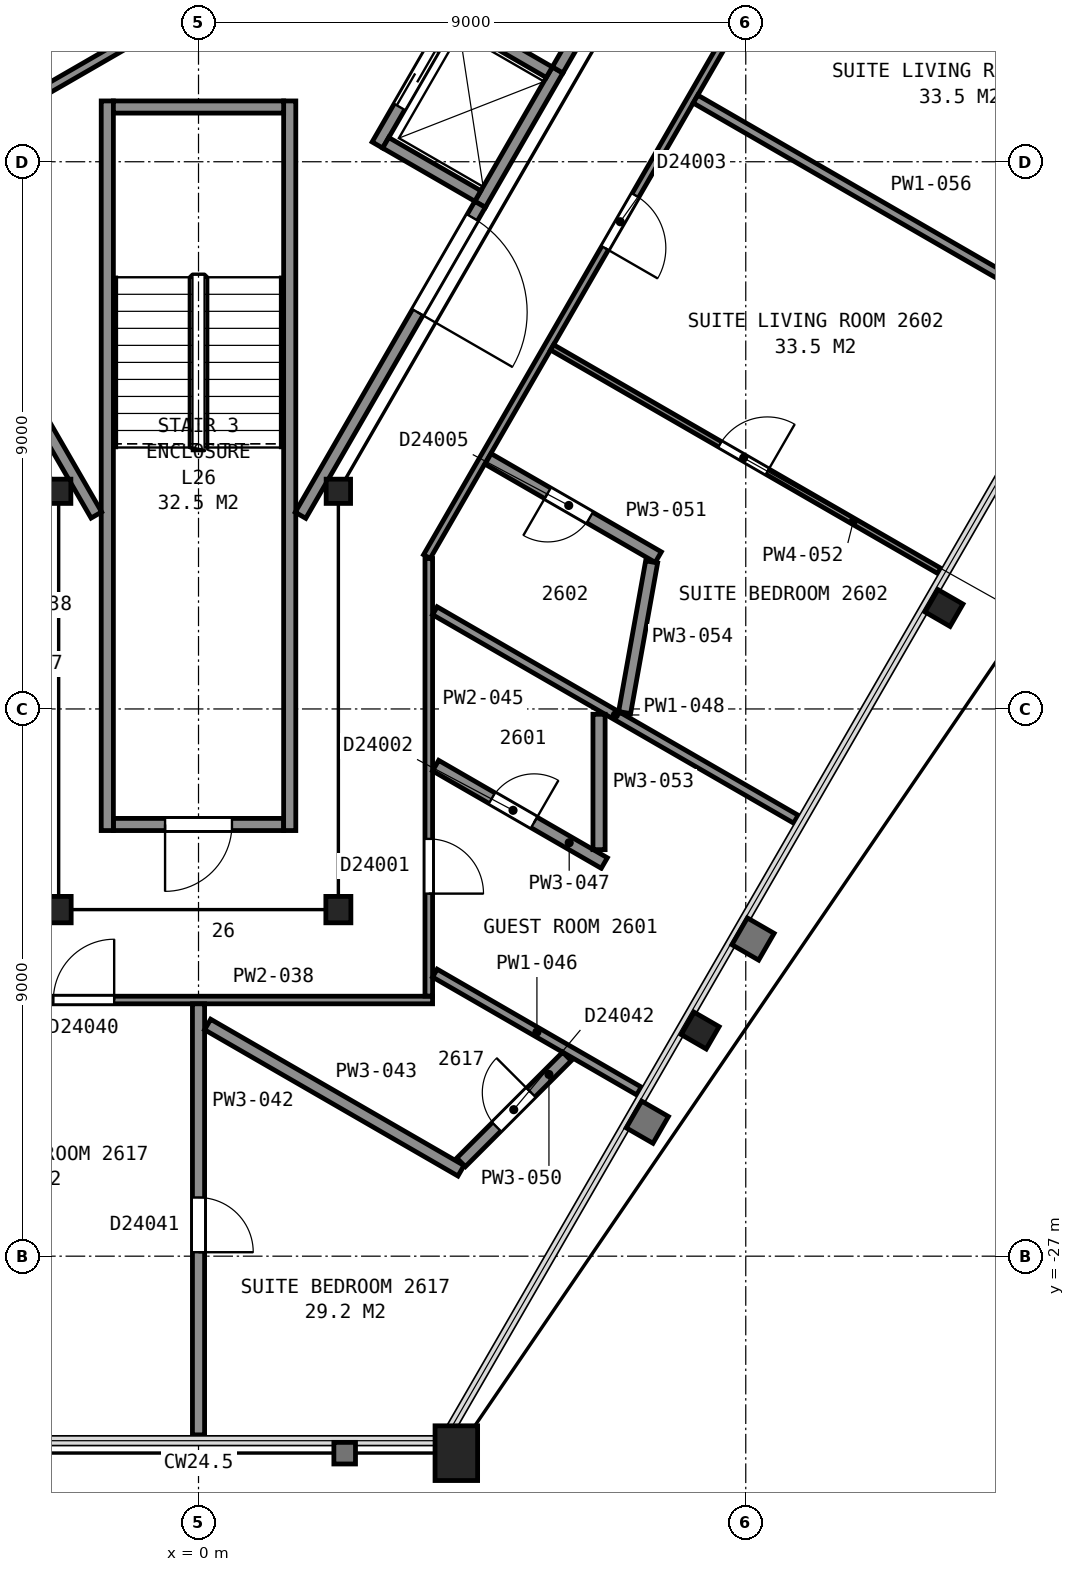
"""IFC4 building model, lengths in metres.
Left out: names, types, materials, properties, quantities, classifications, styles, units other than length and angle.
Written with IfcOpenShell. Run it as: python <this file> out.ifc"""

import sys

from ifc_helpers import new_model, si_unit, direction, frame, frame_2d, origin, origin_2d, place, context, subcontext, project, spatial, rectangle, hollow_rectangle, i_section, extrude, element, fill, save


model = new_model("IFC4")
c1 = context("Model", 3, precision=1e-05, world=origin(), true_north=direction((0.0, 1.0)))
c2 = subcontext(c1, "Body", "Model", "MODEL_VIEW")
j1 = project(units=[si_unit("LENGTHUNIT", "METRE"), si_unit("PLANEANGLEUNIT", "RADIAN")], contexts=[c1])
p1 = place(None, origin())
s1 = spatial("IfcSite", under=j1, at=p1, CompositionType="ELEMENT")
p2 = place(p1, origin())
s2 = spatial("IfcBuilding", under=s1, at=p2, CompositionType="ELEMENT")
p3 = place(p2, frame((0.0, 0.0, 110.8)))
s3 = spatial("IfcBuildingStorey", under=s2, at=p3, CompositionType="ELEMENT", Elevation=110.8)
p4 = place(p3, frame((4.24, -30.24, 0.0), z_axis=(0.0, 0.0, 1.0), x_axis=(-1.0, 0.0, 0.0)))
e1 = element("IfcColumn", 1, at=p4, inside=s3, PredefinedType="COLUMN", context=c2, shape_type="SweptSolid", body=[
    extrude(hollow_rectangle(XDim=0.7, YDim=0.9, WallThickness=0.065, at=origin_2d()), origin(), (0.0, 0.0, 1.0), 3.6),
])
for number, where, z_axis, x_axis in (
    (2, (8.25, -23.29, 0.0), (0.0, 0.0, 1.0), (-0.5, -0.866, 0.0)),
    (3, (12.26, -16.34, 0.0), (0.0, 0.0, 1.0), (-0.5, -0.866, 0.0)),
):
    element("IfcColumn", number, at=place(p3, frame(where, z_axis=z_axis, x_axis=x_axis)), inside=s3, PredefinedType="COLUMN", context=c2, shape_type="SweptSolid", body=[
        extrude(i_section(OverallWidth=0.424, OverallDepth=0.475, WebThickness=0.048, FlangeThickness=0.077, FilletRadius=0.015, at=origin_2d()), origin(), (0.0, 0.0, 1.0), 3.6),
    ])
p5 = place(p3, frame((-2.3, -14.42, 0.0), z_axis=(0.0, 0.0, 1.0), x_axis=(1.0, 0.0, 0.0)))
e4 = element("IfcColumn", 4, at=p5, inside=s3, PredefinedType="COLUMN", context=c2, shape_type="SweptSolid", body=[
    extrude(i_section(OverallWidth=0.401, OverallDepth=0.399, WebThickness=0.025, FlangeThickness=0.04, FilletRadius=0.015, at=origin_2d()), origin(), (0.0, 0.0, 1.0), 3.6),
])
for number, where, z_axis, x_axis in (
    (5, (-2.3, -21.3, 0.0), (0.0, 0.0, 1.0), (-1.0, 0.0, 0.0)),
    (6, (2.3, -21.3, 0.0), (0.0, 0.0, 1.0), (-1.0, 0.0, 0.0)),
):
    element("IfcColumn", number, at=place(p3, frame(where, z_axis=z_axis, x_axis=x_axis)), inside=s3, PredefinedType="COLUMN", context=c2, shape_type="SweptSolid", body=[
        extrude(i_section(OverallWidth=0.411, OverallDepth=0.434, WebThickness=0.036, FlangeThickness=0.057, FilletRadius=0.015, at=origin_2d()), origin(), (0.0, 0.0, 1.0), 3.6),
    ])
p6 = place(p3, frame((2.3, -14.42, 0.0), z_axis=(0.0, 0.0, 1.0), x_axis=(1.0, 0.0, 0.0)))
e7 = element("IfcColumn", 7, at=p6, inside=s3, PredefinedType="COLUMN", context=c2, shape_type="SweptSolid", body=[
    extrude(i_section(OverallWidth=0.401, OverallDepth=0.399, WebThickness=0.025, FlangeThickness=0.04, FilletRadius=0.015, at=origin_2d()), origin(), (0.0, 0.0, 1.0), 3.6),
])
p7 = place(p3, frame((-1.4, -19.9, 0.0), z_axis=(0.0, 0.0, 1.0), x_axis=(1.0, 0.0, 0.0)))
e8 = element("IfcWall", 8, at=p7, inside=s3, PredefinedType="PARTITIONING", context=c2, shape_type="SweptSolid", body=[
    extrude(rectangle(XDim=2.8, YDim=0.2, at=frame_2d((1.4, 0.0))), origin(), (0.0, 0.0, 1.0), 3.35),
])
p8 = place(p7, frame((0.85, 0.0, 0.0)))
e9 = element("IfcOpeningElement", 9, at=p8, cuts=e8, PredefinedType="OPENING", context=c2, shape_type="SweptSolid", body=[
    extrude(rectangle(XDim=1.1, YDim=2.1, at=frame_2d((0.55, 1.05))), frame((0.0, 0.11, 0.0), z_axis=(0.0, -1.0, 0.0), x_axis=(1.0, 0.0, 0.0)), (0.0, 0.0, 1.0), 0.22),
])
for number, where, z_axis, x_axis in (
    (10, (1.5, -8.0, 0.0), (0.0, 0.0, 1.0), (0.0, -1.0, 0.0)),
    (11, (-1.5, -8.0, 0.0), (0.0, 0.0, 1.0), (0.0, -1.0, 0.0)),
):
    element("IfcWall", number, at=place(p3, frame(where, z_axis=z_axis, x_axis=x_axis)), inside=s3, PredefinedType="PARTITIONING", context=c2, shape_type="SweptSolid", body=[
        extrude(rectangle(XDim=12.0, YDim=0.2, at=frame_2d((6.0, 0.0))), origin(), (0.0, 0.0, 1.0), 3.35),
    ])
p9 = place(p3, frame((-1.4, -8.1, 0.0), z_axis=(0.0, 0.0, 1.0), x_axis=(1.0, 0.0, 0.0)))
e12 = element("IfcWall", 12, at=p9, inside=s3, PredefinedType="PARTITIONING", context=c2, shape_type="SweptSolid", body=[
    extrude(rectangle(XDim=2.8, YDim=0.2, at=frame_2d((1.4, 0.0))), origin(), (0.0, 0.0, 1.0), 3.35),
])
p10 = place(p3, frame((4.63, -9.7, 0.0), z_axis=(0.0, 0.0, 1.0), x_axis=(0.500062241894, 0.865989465428, 0.0)))
e13 = element("IfcWall", 13, at=p10, inside=s3, PredefinedType="PARTITIONING", context=c2, shape_type="SweptSolid", body=[
    extrude(rectangle(XDim=2.55, YDim=0.2, at=frame_2d((1.275, 0.0))), origin(), (0.0, 0.0, 1.0), 3.6),
])
p11 = place(p3, frame((2.942, -8.725, 0.0), z_axis=(0.0, 0.0, 1.0), x_axis=(0.500020783669, 0.866013403995, 0.0)))
e14 = element("IfcWall", 14, at=p11, inside=s3, PredefinedType="PARTITIONING", context=c2, shape_type="SweptSolid", body=[
    extrude(rectangle(XDim=2.55, YDim=0.2, at=frame_2d((1.275, 0.0))), origin(), (0.0, 0.0, 1.0), 3.6),
])
p12 = place(p11, frame((0.725, 0.0, 0.0)))
e15 = element("IfcOpeningElement", 15, at=p12, cuts=e14, PredefinedType="OPENING", context=c2, shape_type="SweptSolid", body=[
    extrude(rectangle(XDim=1.1, YDim=2.1, at=frame_2d((0.55, 1.05))), frame((0.0, 0.11, 0.0), z_axis=(0.0, -1.0, 0.0), x_axis=(1.0, 0.0, 0.0)), (0.0, 0.0, 1.0), 0.22),
])
p13 = place(p3, frame((5.769, -7.528, 0.0), z_axis=(0.0, 0.0, 1.0), x_axis=(-0.866002029911, 0.500040482552, 0.0)))
e16 = element("IfcWall", 16, at=p13, inside=s3, PredefinedType="PARTITIONING", context=c2, shape_type="SweptSolid", body=[
    extrude(rectangle(XDim=1.75, YDim=0.2, at=frame_2d((0.875, 0.0))), origin(), (0.0, 0.0, 1.0), 3.6),
])
p14 = place(p3, frame((4.594, -9.563, 0.0), z_axis=(0.0, 0.0, 1.0), x_axis=(-0.866036909293, 0.499980071345, 0.0)))
e17 = element("IfcWall", 17, at=p14, inside=s3, PredefinedType="PARTITIONING", context=c2, shape_type="SweptSolid", body=[
    extrude(rectangle(XDim=1.75, YDim=0.2, at=frame_2d((0.875, 0.0))), origin(), (0.0, 0.0, 1.0), 3.6),
])
p15 = place(p3, frame((-13.664, 5.946, 0.0), z_axis=(0.0, 0.0, 1.0), x_axis=(0.499994327219, -0.866028678941, 0.0)))
e18 = element("IfcWall", 18, at=p15, inside=s3, PredefinedType="PARTITIONING", context=c2, shape_type="SweptSolid", body=[
    extrude(rectangle(XDim=23.968, YDim=0.2, at=frame_2d((11.984, 0.0))), origin(), (0.0, 0.0, 1.0), 3.35),
])
p16 = place(p3, frame((-4.825, -9.154, 0.0), z_axis=(0.0, 0.0, 1.0), x_axis=(0.866023738697, 0.500002884005, 0.0)))
e19 = element("IfcWall", 19, at=p16, inside=s3, PredefinedType="PARTITIONING", context=c2, shape_type="SweptSolid", body=[
    extrude(rectangle(XDim=4.22, YDim=0.15, at=frame_2d((2.11, 0.0))), origin(), (0.0, 0.0, 1.0), 3.35),
])
p17 = place(p16, frame((1.595, 0.0, 0.0)))
e20 = element("IfcOpeningElement", 20, at=p17, cuts=e19, PredefinedType="OPENING", context=c2, shape_type="SweptSolid", body=[
    extrude(rectangle(XDim=0.9, YDim=2.1, at=frame_2d((0.45, 1.05))), frame((0.0, 0.085, 0.0), z_axis=(0.0, -1.0, 0.0), x_axis=(1.0, 0.0, 0.0)), (0.0, 0.0, 1.0), 0.17),
])
p18 = place(p3, frame((1.677, -14.815, 0.0), z_axis=(0.0, 0.0, 1.0), x_axis=(0.49999445743, 0.866028603765, 0.0)))
e21 = element("IfcWall", 21, at=p18, inside=s3, PredefinedType="PARTITIONING", context=c2, shape_type="SweptSolid", body=[
    extrude(rectangle(XDim=5.905, YDim=0.2, at=frame_2d((2.952, 0.0))), origin(), (0.0, 0.0, 1.0), 3.35),
])
p19 = place(p18, frame((3.855, 0.0, 0.0)))
e22 = element("IfcOpeningElement", 22, at=p19, cuts=e21, PredefinedType="OPENING", context=c2, shape_type="SweptSolid", body=[
    extrude(rectangle(XDim=1.8, YDim=2.1, at=frame_2d((0.9, 1.05))), frame((0.0, 0.11, 0.0), z_axis=(0.0, -1.0, 0.0), x_axis=(1.0, 0.0, 0.0)), (0.0, 0.0, 1.0), 0.22),
])
p20 = place(p3, frame((5.906, -7.49, 0.0), z_axis=(0.0, 0.0, 1.0), x_axis=(0.500252727967, 0.865879442048, 0.0)))
e23 = element("IfcWall", 23, at=p20, inside=s3, PredefinedType="PARTITIONING", context=c2, shape_type="SweptSolid", body=[
    extrude(rectangle(XDim=2.617, YDim=0.2, at=frame_2d((1.309, 0.0))), origin(), (0.0, 0.0, 1.0), 3.35),
])
p21 = place(p3, frame((3.85, -22.787, 0.0), z_axis=(0.0, 0.0, 1.0), x_axis=(-1.0, 0.0, 0.0)))
e24 = element("IfcWall", 24, at=p21, inside=s3, PredefinedType="PARTITIONING", context=c2, shape_type="SweptSolid", body=[
    extrude(rectangle(XDim=7.699, YDim=0.125, at=frame_2d((3.85, 0.0))), origin(), (0.0, 0.0, 1.0), 2.613),
])
p22 = place(p21, frame((5.237, 0.0, 0.0)))
e25 = element("IfcOpeningElement", 25, at=p22, cuts=e24, PredefinedType="OPENING", context=c2, shape_type="SweptSolid", body=[
    extrude(rectangle(XDim=1.0, YDim=2.1, at=frame_2d((0.5, 1.05))), frame((0.0, 0.073, 0.0), z_axis=(0.0, -1.0, 0.0), x_axis=(1.0, 0.0, 0.0)), (0.0, 0.0, 1.0), 0.145),
])
p23 = place(p3, frame((0.0, -22.85, 0.0), z_axis=(0.0, 0.0, 1.0), x_axis=(0.0, -1.0, 0.0)))
e26 = element("IfcWall", 26, at=p23, inside=s3, PredefinedType="PARTITIONING", context=c2, shape_type="SweptSolid", body=[
    extrude(rectangle(XDim=7.089, YDim=0.2, at=frame_2d((3.545, 0.0))), origin(), (0.0, 0.0, 1.0), 2.613),
])
p24 = place(p23, frame((3.186, 0.0, 0.0)))
e27 = element("IfcOpeningElement", 27, at=p24, cuts=e26, PredefinedType="OPENING", context=c2, shape_type="SweptSolid", body=[
    extrude(rectangle(XDim=0.9, YDim=2.1, at=frame_2d((0.45, 1.05))), frame((0.0, 0.11, 0.0), z_axis=(0.0, -1.0, 0.0), x_axis=(1.0, 0.0, 0.0)), (0.0, 0.0, 1.0), 0.22),
])
p25 = place(p3, frame((0.15, -23.19, 0.0), z_axis=(0.0, 0.0, 1.0), x_axis=(0.866061372545, -0.499937695103, 0.0)))
e28 = element("IfcWall", 28, at=p25, inside=s3, PredefinedType="PARTITIONING", context=c2, shape_type="SweptSolid", body=[
    extrude(rectangle(XDim=4.811, YDim=0.2, at=frame_2d((2.406, 0.0))), origin(), (0.0, 0.0, 1.0), 2.613),
])
p26 = place(p3, frame((3.787, -15.525, 0.0), z_axis=(0.0, 0.0, 1.0), x_axis=(0.0, -1.0, 0.0)))
e29 = element("IfcWall", 29, at=p26, inside=s3, PredefinedType="PARTITIONING", context=c2, shape_type="SweptSolid", body=[
    extrude(rectangle(XDim=7.197, YDim=0.125, at=frame_2d((3.599, 0.0))), origin(), (0.0, 0.0, 1.0), 2.613),
])
p27 = place(p26, frame((4.612, 0.0, 0.0)))
e30 = element("IfcOpeningElement", 30, at=p27, cuts=e29, PredefinedType="OPENING", context=c2, shape_type="SweptSolid", body=[
    extrude(rectangle(XDim=0.9, YDim=2.1, at=frame_2d((0.45, 1.05))), frame((0.0, 0.073, 0.0), z_axis=(0.0, -1.0, 0.0), x_axis=(1.0, 0.0, 0.0)), (0.0, 0.0, 1.0), 0.145),
])
p28 = place(p3, frame((3.887, -22.345, 0.0), z_axis=(0.0, 0.0, 1.0), x_axis=(0.865997824551, -0.500047765591, 0.0)))
e31 = element("IfcWall", 31, at=p28, inside=s3, PredefinedType="PARTITIONING", context=c2, shape_type="SweptSolid", body=[
    extrude(rectangle(XDim=3.876, YDim=0.15, at=frame_2d((1.938, 0.0))), origin(), (0.0, 0.0, 1.0), 2.613),
])
p29 = place(p3, frame((3.899, -18.932, 0.0), z_axis=(0.0, 0.0, 1.0), x_axis=(0.865973625928, -0.500089671156, 0.0)))
e32 = element("IfcWall", 32, at=p29, inside=s3, PredefinedType="PARTITIONING", context=c2, shape_type="SweptSolid", body=[
    extrude(rectangle(XDim=3.204, YDim=0.2, at=frame_2d((1.602, 0.0))), origin(), (0.0, 0.0, 1.0), 2.613),
])
p30 = place(p29, frame((1.07, 0.0, 0.0)))
e33 = element("IfcOpeningElement", 33, at=p30, cuts=e32, PredefinedType="OPENING", context=c2, shape_type="SweptSolid", body=[
    extrude(rectangle(XDim=0.8, YDim=2.1, at=frame_2d((0.4, 1.05))), frame((0.0, 0.11, 0.0), z_axis=(0.0, -1.0, 0.0), x_axis=(1.0, 0.0, 0.0)), (0.0, 0.0, 1.0), 0.22),
])
p31 = place(p3, frame((3.887, -16.385, 0.0), z_axis=(0.0, 0.0, 1.0), x_axis=(0.86602133163, -0.500007053112, 0.0)))
e34 = element("IfcWall", 34, at=p31, inside=s3, PredefinedType="PARTITIONING", context=c2, shape_type="SweptSolid", body=[
    extrude(rectangle(XDim=6.856, YDim=0.15, at=frame_2d((3.428, 0.0))), origin(), (0.0, 0.0, 1.0), 2.613),
])
p32 = place(p3, frame((15.684, 5.165, 0.0), z_axis=(0.0, 0.0, 1.0), x_axis=(-0.500027787016, -0.866009360349, 0.0)))
e35 = element("IfcWall", 35, at=p32, inside=s3, PredefinedType="PARTITIONING", context=c2, shape_type="SweptSolid", body=[
    extrude(rectangle(XDim=23.856, YDim=0.125, at=frame_2d((11.928, 0.0))), origin(), (0.0, 0.0, 1.0), 2.613),
])
p33 = place(p32, frame((16.996, 0.0, 0.0)))
e36 = element("IfcOpeningElement", 36, at=p33, cuts=e35, PredefinedType="OPENING", context=c2, shape_type="SweptSolid", body=[
    extrude(rectangle(XDim=1.0, YDim=2.1, at=frame_2d((0.5, 1.05))), frame((0.0, 0.073, 0.0), z_axis=(0.0, -1.0, 0.0), x_axis=(1.0, 0.0, 0.0)), (0.0, 0.0, 1.0), 0.145),
])
p34 = place(p32, frame((12.28, 0.0, 0.0)))
e37 = element("IfcOpeningElement", 37, at=p34, cuts=e35, PredefinedType="OPENING", context=c2, shape_type="SweptSolid", body=[
    extrude(rectangle(XDim=1.0, YDim=2.1, at=frame_2d((0.5, 1.05))), frame((0.0, 0.073, 0.0), z_axis=(0.0, -1.0, 0.0), x_axis=(1.0, 0.0, 0.0)), (0.0, 0.0, 1.0), 0.145),
])
p35 = place(p3, frame((4.318, -25.457, 0.0), z_axis=(0.0, 0.0, 1.0), x_axis=(0.70690846209, 0.707305044677, 0.0)))
e38 = element("IfcWall", 38, at=p35, inside=s3, PredefinedType="PARTITIONING", context=c2, shape_type="SweptSolid", body=[
    extrude(rectangle(XDim=2.462, YDim=0.2, at=frame_2d((1.231, 0.0))), origin(), (0.0, 0.0, 1.0), 2.613),
])
p36 = place(p35, frame((0.825, 0.0, 0.0)))
e39 = element("IfcOpeningElement", 39, at=p36, cuts=e38, PredefinedType="OPENING", context=c2, shape_type="SweptSolid", body=[
    extrude(rectangle(XDim=0.8, YDim=2.1, at=frame_2d((0.4, 1.05))), frame((0.0, 0.11, 0.0), z_axis=(0.0, -1.0, 0.0), x_axis=(1.0, 0.0, 0.0)), (0.0, 0.0, 1.0), 0.22),
])
p37 = place(p3, frame((7.562, -15.503, 0.0), z_axis=(0.0, 0.0, 1.0), x_axis=(-0.866078705744, 0.499907666931, 0.0)))
e40 = element("IfcWall", 40, at=p37, inside=s3, PredefinedType="PARTITIONING", context=c2, shape_type="SweptSolid", body=[
    extrude(rectangle(XDim=3.233, YDim=0.2, at=frame_2d((1.616, 0.0))), origin(), (0.0, 0.0, 1.0), 2.613),
])
p38 = place(p37, frame((1.301, 0.0, 0.0)))
e41 = element("IfcOpeningElement", 41, at=p38, cuts=e40, PredefinedType="OPENING", context=c2, shape_type="SweptSolid", body=[
    extrude(rectangle(XDim=0.8, YDim=2.1, at=frame_2d((0.4, 1.05))), frame((0.0, 0.11, 0.0), z_axis=(0.0, -1.0, 0.0), x_axis=(1.0, 0.0, 0.0)), (0.0, 0.0, 1.0), 0.22),
])
p39 = place(p3, frame((12.183, -15.729, 0.0), z_axis=(0.0, 0.0, 1.0), x_axis=(-0.866066702559, 0.499928461601, 0.0)))
e42 = element("IfcWall", 42, at=p39, inside=s3, PredefinedType="PARTITIONING", context=c2, shape_type="SweptSolid", body=[
    extrude(rectangle(XDim=7.352, YDim=0.1, at=frame_2d((3.676, 0.0))), origin(), (0.0, 0.0, 1.0), 2.613),
])
p40 = place(p39, frame((3.265, 0.0, 0.0)))
e43 = element("IfcOpeningElement", 43, at=p40, cuts=e42, PredefinedType="OPENING", context=c2, shape_type="SweptSolid", body=[
    extrude(rectangle(XDim=0.9, YDim=2.1, at=frame_2d((0.45, 1.05))), frame((0.0, 0.06, 0.0), z_axis=(0.0, -1.0, 0.0), x_axis=(1.0, 0.0, 0.0)), (0.0, 0.0, 1.0), 0.12),
])
p41 = place(p3, frame((6.587, -20.314, 0.0), z_axis=(0.0, 0.0, 1.0), x_axis=(0.0, 1.0, 0.0)))
e44 = element("IfcWall", 44, at=p41, inside=s3, PredefinedType="PARTITIONING", context=c2, shape_type="SweptSolid", body=[
    extrude(rectangle(XDim=2.227, YDim=0.2, at=frame_2d((1.113, 0.0))), origin(), (0.0, 0.0, 1.0), 2.613),
])
p42 = place(p3, frame((7.007, -18.06, 0.0), z_axis=(0.0, 0.0, 1.0), x_axis=(0.176615903702, 0.984279849717, 0.0)))
e45 = element("IfcWall", 45, at=p42, inside=s3, PredefinedType="PARTITIONING", context=c2, shape_type="SweptSolid", body=[
    extrude(rectangle(XDim=2.519, YDim=0.2, at=frame_2d((1.259, 0.0))), origin(), (0.0, 0.0, 1.0), 2.613),
])
p43 = place(p3, frame((8.173, -7.969, 0.0), z_axis=(0.0, 0.0, 1.0), x_axis=(0.86596990005, -0.500096122968, 0.0)))
e46 = element("IfcWall", 46, at=p43, inside=s3, PredefinedType="PARTITIONING", context=c2, shape_type="SweptSolid", body=[
    extrude(rectangle(XDim=7.352, YDim=0.15, at=frame_2d((3.676, 0.0))), origin(), (0.0, 0.0, 1.0), 2.613),
])
p44 = place(p3, frame((10.53, -3.886, 0.0), z_axis=(0.0, 0.0, 1.0), x_axis=(0.8660606245, -0.499938990969, 0.0)))
e47 = element("IfcWall", 47, at=p44, inside=s3, PredefinedType="PARTITIONING", context=c2, shape_type="SweptSolid", body=[
    extrude(rectangle(XDim=7.353, YDim=0.1, at=frame_2d((3.676, 0.0))), origin(), (0.0, 0.0, 1.0), 2.613),
])
p45 = place(p44, frame((3.188, 0.0, 0.0)))
e48 = element("IfcOpeningElement", 48, at=p45, cuts=e47, PredefinedType="OPENING", context=c2, shape_type="SweptSolid", body=[
    extrude(rectangle(XDim=0.9, YDim=2.1, at=frame_2d((0.45, 1.05))), frame((0.0, 0.06, 0.0), z_axis=(0.0, -1.0, 0.0), x_axis=(1.0, 0.0, 0.0)), (0.0, 0.0, 1.0), 0.12),
])
p46 = place(p8, origin())
e49 = element("IfcDoor", 49, at=p46, inside=s3, OperationType="SINGLE_SWING_LEFT", PredefinedType="DOOR", context=c2, shape_type="SweptSolid", body=[
    extrude(rectangle(XDim=1.1, YDim=2.1, at=frame_2d((0.55, 1.05))), frame((0.0, 0.025, 0.0), z_axis=(0.0, -1.0, 0.0), x_axis=(1.0, 0.0, 0.0)), (0.0, 0.0, 1.0), 0.05),
])
fill(e9, e49)
p47 = place(p12, origin())
e50 = element("IfcDoor", 50, at=p47, inside=s3, OperationType="SLIDING_TO_RIGHT", PredefinedType="DOOR", context=c2, shape_type="SweptSolid", body=[
    extrude(rectangle(XDim=1.1, YDim=2.1, at=frame_2d((0.55, 1.05))), frame((0.0, 0.025, 0.0), z_axis=(0.0, -1.0, 0.0), x_axis=(1.0, 0.0, 0.0)), (0.0, 0.0, 1.0), 0.05),
])
fill(e15, e50)
p48 = place(p19, origin())
e51 = element("IfcDoor", 51, at=p48, inside=s3, OperationType="DOUBLE_DOOR_SINGLE_SWING", PredefinedType="DOOR", context=c2, shape_type="SweptSolid", body=[
    extrude(rectangle(XDim=1.8, YDim=2.1, at=frame_2d((0.9, 1.05))), frame((0.0, 0.025, 0.0), z_axis=(0.0, -1.0, 0.0), x_axis=(1.0, 0.0, 0.0)), (0.0, 0.0, 1.0), 0.05),
])
fill(e22, e51)
p49 = place(p22, origin())
e52 = element("IfcDoor", 52, at=p49, inside=s3, OperationType="SINGLE_SWING_LEFT", PredefinedType="DOOR", context=c2, shape_type="SweptSolid", body=[
    extrude(rectangle(XDim=1.0, YDim=2.1, at=frame_2d((0.5, 1.05))), frame((0.0, 0.025, 0.0), z_axis=(0.0, -1.0, 0.0), x_axis=(1.0, 0.0, 0.0)), (0.0, 0.0, 1.0), 0.05),
])
fill(e25, e52)
p50 = place(p24, origin())
e53 = element("IfcDoor", 53, at=p50, inside=s3, OperationType="SINGLE_SWING_RIGHT", PredefinedType="DOOR", context=c2, shape_type="SweptSolid", body=[
    extrude(rectangle(XDim=0.9, YDim=2.1, at=frame_2d((0.45, 1.05))), frame((0.0, 0.025, 0.0), z_axis=(0.0, -1.0, 0.0), x_axis=(1.0, 0.0, 0.0)), (0.0, 0.0, 1.0), 0.05),
])
fill(e27, e53)
p51 = place(p27, origin())
e54 = element("IfcDoor", 54, at=p51, inside=s3, OperationType="SINGLE_SWING_RIGHT", PredefinedType="DOOR", context=c2, shape_type="SweptSolid", body=[
    extrude(rectangle(XDim=0.9, YDim=2.1, at=frame_2d((0.45, 1.05))), frame((0.0, 0.025, 0.0), z_axis=(0.0, -1.0, 0.0), x_axis=(1.0, 0.0, 0.0)), (0.0, 0.0, 1.0), 0.05),
])
fill(e30, e54)
p52 = place(p30, origin())
e55 = element("IfcDoor", 55, at=p52, inside=s3, OperationType="SINGLE_SWING_RIGHT", PredefinedType="DOOR", context=c2, shape_type="SweptSolid", body=[
    extrude(rectangle(XDim=0.8, YDim=2.1, at=frame_2d((0.4, 1.05))), frame((0.0, 0.025, 0.0), z_axis=(0.0, -1.0, 0.0), x_axis=(1.0, 0.0, 0.0)), (0.0, 0.0, 1.0), 0.05),
])
fill(e33, e55)
p53 = place(p33, origin())
e56 = element("IfcDoor", 56, at=p53, inside=s3, OperationType="SINGLE_SWING_RIGHT", PredefinedType="DOOR", context=c2, shape_type="SweptSolid", body=[
    extrude(rectangle(XDim=1.0, YDim=2.1, at=frame_2d((0.5, 1.05))), frame((0.0, 0.025, 0.0), z_axis=(0.0, -1.0, 0.0), x_axis=(1.0, 0.0, 0.0)), (0.0, 0.0, 1.0), 0.05),
])
fill(e36, e56)
p54 = place(p36, origin())
e57 = element("IfcDoor", 57, at=p54, inside=s3, OperationType="SINGLE_SWING_RIGHT", PredefinedType="DOOR", context=c2, shape_type="SweptSolid", body=[
    extrude(rectangle(XDim=0.8, YDim=2.1, at=frame_2d((0.4, 1.05))), frame((0.0, 0.025, 0.0), z_axis=(0.0, -1.0, 0.0), x_axis=(1.0, 0.0, 0.0)), (0.0, 0.0, 1.0), 0.05),
])
fill(e39, e57)
p55 = place(p38, origin())
e58 = element("IfcDoor", 58, at=p55, inside=s3, OperationType="SINGLE_SWING_RIGHT", PredefinedType="DOOR", context=c2, shape_type="SweptSolid", body=[
    extrude(rectangle(XDim=0.8, YDim=2.1, at=frame_2d((0.4, 1.05))), frame((0.0, 0.025, 0.0), z_axis=(0.0, -1.0, 0.0), x_axis=(1.0, 0.0, 0.0)), (0.0, 0.0, 1.0), 0.05),
])
fill(e41, e58)
p56 = place(p40, origin())
e59 = element("IfcDoor", 59, at=p56, inside=s3, OperationType="SINGLE_SWING_LEFT", PredefinedType="DOOR", context=c2, shape_type="SweptSolid", body=[
    extrude(rectangle(XDim=0.9, YDim=2.1, at=frame_2d((0.45, 1.05))), frame((0.0, 0.025, 0.0), z_axis=(0.0, -1.0, 0.0), x_axis=(1.0, 0.0, 0.0)), (0.0, 0.0, 1.0), 0.05),
])
fill(e43, e59)
save(model, sys.argv[1])
